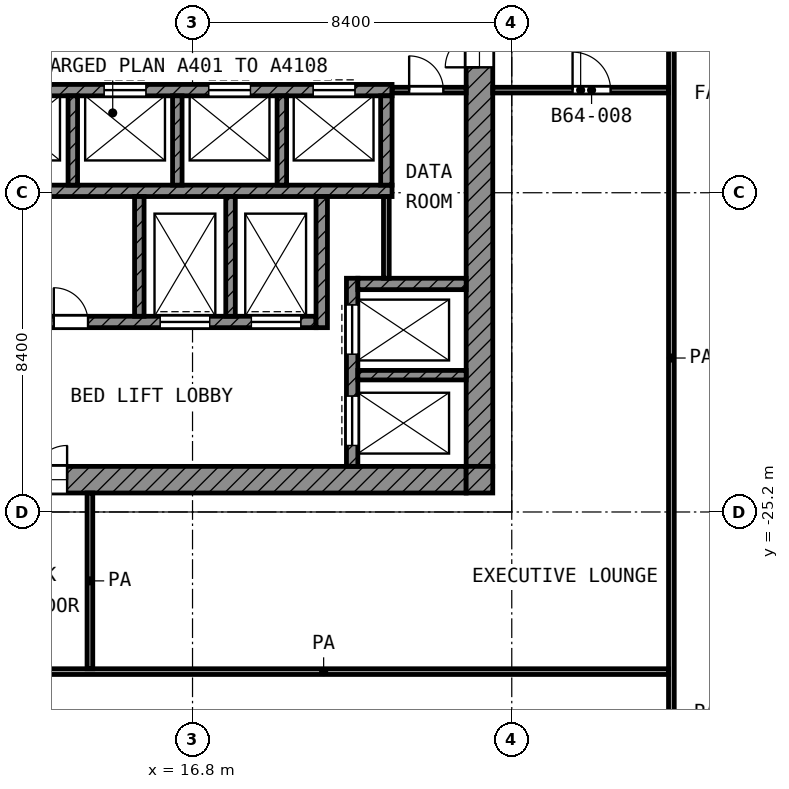
"""IFC4 building model, lengths in metres.
Left out: names, types, materials, properties, quantities, classifications, styles, units other than length and angle.
Written with IfcOpenShell. Run it as: python <this file> out.ifc"""

import sys

from ifc_helpers import new_model, si_unit, direction, frame, frame_2d, origin, place, context, subcontext, project, spatial, rectangle, extrude, element, fill, save


model = new_model("IFC4")
c1 = context("Model", 3, precision=1e-05, world=origin(), true_north=direction((0.0, 1.0)))
c2 = subcontext(c1, "Body", "Model", "MODEL_VIEW")
j1 = project(units=[si_unit("LENGTHUNIT", "METRE"), si_unit("PLANEANGLEUNIT", "RADIAN")], contexts=[c1])
p1 = place(None, origin())
s1 = spatial("IfcSite", under=j1, at=p1, CompositionType="ELEMENT")
p2 = place(p1, origin())
s2 = spatial("IfcBuilding", under=s1, at=p2, CompositionType="ELEMENT")
p3 = place(p2, frame((0.0, 0.0, 277.6)))
s3 = spatial("IfcBuildingStorey", under=s2, at=p3, CompositionType="ELEMENT", Elevation=277.6)
p4 = place(p3, frame((24.35, -24.0, 0.0), z_axis=(0.0, 0.0, 1.0), x_axis=(0.0, 1.0, 0.0)))
e1 = element("IfcWall", 1, at=p4, inside=s3, PredefinedType="SHEAR", context=c2, shape_type="SweptSolid", body=[
    extrude(rectangle(XDim=18.6, YDim=0.7, at=frame_2d((9.3, 0.0))), origin(), (0.0, 0.0, 1.0), 3.6),
])
p5 = place(p4, frame((10.5, 0.0, 0.0)))
e2 = element("IfcOpeningElement", 2, at=p5, cuts=e1, PredefinedType="OPENING", context=c2, shape_type="SweptSolid", body=[
    extrude(rectangle(XDim=1.8, YDim=2.1, at=frame_2d((0.9, 1.05))), frame((0.0, 0.36, 0.0), z_axis=(0.0, -1.0, 0.0), x_axis=(1.0, 0.0, 0.0)), (0.0, 0.0, 1.0), 0.72),
])
p6 = place(p3, frame((5.4, -24.35, 0.0), z_axis=(0.0, 0.0, 1.0), x_axis=(1.0, 0.0, 0.0)))
e3 = element("IfcWall", 3, at=p6, inside=s3, PredefinedType="SHEAR", context=c2, shape_type="SweptSolid", body=[
    extrude(rectangle(XDim=18.6, YDim=0.7, at=frame_2d((9.3, 0.0))), origin(), (0.0, 0.0, 1.0), 3.6),
])
p7 = place(p6, frame((6.3, 0.0, 0.0)))
e4 = element("IfcOpeningElement", 4, at=p7, cuts=e3, PredefinedType="OPENING", context=c2, shape_type="SweptSolid", body=[
    extrude(rectangle(XDim=1.8, YDim=2.1, at=frame_2d((0.9, 1.05))), frame((0.0, 0.36, 0.0), z_axis=(0.0, -1.0, 0.0), x_axis=(1.0, 0.0, 0.0)), (0.0, 0.0, 1.0), 0.72),
])
p8 = place(p3, frame((24.35, -24.7, 0.0), z_axis=(0.0, 0.0, 1.0), x_axis=(0.0, 1.0, 0.0)))
e5 = element("IfcWall", 5, at=p8, inside=s3, PredefinedType="SHEAR", context=c2, shape_type="SweptSolid", body=[
    extrude(rectangle(XDim=0.7, YDim=0.7, at=frame_2d((0.35, 0.0))), origin(), (0.0, 0.0, 1.0), 3.6),
])
p9 = place(p3, frame((5.4, -14.1, 0.0), z_axis=(0.0, 0.0, 1.0), x_axis=(1.0, 0.0, 0.0)))
e6 = element("IfcWall", 6, at=p9, inside=s3, PredefinedType="SHEAR", context=c2, shape_type="SweptSolid", body=[
    extrude(rectangle(XDim=16.65, YDim=0.3, at=frame_2d((8.325, 0.0))), origin(), (0.0, 0.0, 1.0), 3.6),
])
p10 = place(p9, frame((0.825, 0.0, 0.0)))
e7 = element("IfcOpeningElement", 7, at=p10, cuts=e6, PredefinedType="OPENING", context=c2, shape_type="SweptSolid", body=[
    extrude(rectangle(XDim=1.1, YDim=2.1, at=frame_2d((0.55, 1.05))), frame((0.0, 0.16, 0.0), z_axis=(0.0, -1.0, 0.0), x_axis=(1.0, 0.0, 0.0)), (0.0, 0.0, 1.0), 0.32),
])
p11 = place(p9, frame((3.575, 0.0, 0.0)))
e8 = element("IfcOpeningElement", 8, at=p11, cuts=e6, PredefinedType="OPENING", context=c2, shape_type="SweptSolid", body=[
    extrude(rectangle(XDim=1.1, YDim=2.1, at=frame_2d((0.55, 1.05))), frame((0.0, 0.16, 0.0), z_axis=(0.0, -1.0, 0.0), x_axis=(1.0, 0.0, 0.0)), (0.0, 0.0, 1.0), 0.32),
])
p12 = place(p9, frame((6.325, 0.0, 0.0)))
e9 = element("IfcOpeningElement", 9, at=p12, cuts=e6, PredefinedType="OPENING", context=c2, shape_type="SweptSolid", body=[
    extrude(rectangle(XDim=1.1, YDim=2.1, at=frame_2d((0.55, 1.05))), frame((0.0, 0.16, 0.0), z_axis=(0.0, -1.0, 0.0), x_axis=(1.0, 0.0, 0.0)), (0.0, 0.0, 1.0), 0.32),
])
p13 = place(p9, frame((9.075, 0.0, 0.0)))
e10 = element("IfcOpeningElement", 10, at=p13, cuts=e6, PredefinedType="OPENING", context=c2, shape_type="SweptSolid", body=[
    extrude(rectangle(XDim=1.1, YDim=2.1, at=frame_2d((0.55, 1.05))), frame((0.0, 0.16, 0.0), z_axis=(0.0, -1.0, 0.0), x_axis=(1.0, 0.0, 0.0)), (0.0, 0.0, 1.0), 0.32),
])
p14 = place(p9, frame((11.825, 0.0, 0.0)))
e11 = element("IfcOpeningElement", 11, at=p14, cuts=e6, PredefinedType="OPENING", context=c2, shape_type="SweptSolid", body=[
    extrude(rectangle(XDim=1.1, YDim=2.1, at=frame_2d((0.55, 1.05))), frame((0.0, 0.16, 0.0), z_axis=(0.0, -1.0, 0.0), x_axis=(1.0, 0.0, 0.0)), (0.0, 0.0, 1.0), 0.32),
])
p15 = place(p9, frame((14.575, 0.0, 0.0)))
e12 = element("IfcOpeningElement", 12, at=p15, cuts=e6, PredefinedType="OPENING", context=c2, shape_type="SweptSolid", body=[
    extrude(rectangle(XDim=1.1, YDim=2.1, at=frame_2d((0.55, 1.05))), frame((0.0, 0.16, 0.0), z_axis=(0.0, -1.0, 0.0), x_axis=(1.0, 0.0, 0.0)), (0.0, 0.0, 1.0), 0.32),
])
p16 = place(p3, frame((5.4, -16.75, 0.0), z_axis=(0.0, 0.0, 1.0), x_axis=(1.0, 0.0, 0.0)))
e13 = element("IfcWall", 13, at=p16, inside=s3, PredefinedType="SHEAR", context=c2, shape_type="SweptSolid", body=[
    extrude(rectangle(XDim=16.65, YDim=0.3, at=frame_2d((8.325, 0.0))), origin(), (0.0, 0.0, 1.0), 3.6),
])
p17 = place(p3, frame((5.4, -20.2, 0.0), z_axis=(0.0, 0.0, 1.0), x_axis=(1.0, 0.0, 0.0)))
e14 = element("IfcWall", 14, at=p17, inside=s3, PredefinedType="SHEAR", context=c2, shape_type="SweptSolid", body=[
    extrude(rectangle(XDim=14.65, YDim=0.3, at=frame_2d((7.325, 0.0))), origin(), (0.0, 0.0, 1.0), 3.6),
])
p18 = place(p17, frame((10.55, 0.0, 0.0)))
e15 = element("IfcOpeningElement", 15, at=p18, cuts=e14, PredefinedType="OPENING", context=c2, shape_type="SweptSolid", body=[
    extrude(rectangle(XDim=1.3, YDim=2.1, at=frame_2d((0.65, 1.05))), frame((0.0, 0.16, 0.0), z_axis=(0.0, -1.0, 0.0), x_axis=(1.0, 0.0, 0.0)), (0.0, 0.0, 1.0), 0.32),
])
p19 = place(p17, frame((12.95, 0.0, 0.0)))
e16 = element("IfcOpeningElement", 16, at=p19, cuts=e14, PredefinedType="OPENING", context=c2, shape_type="SweptSolid", body=[
    extrude(rectangle(XDim=1.3, YDim=2.1, at=frame_2d((0.65, 1.05))), frame((0.0, 0.16, 0.0), z_axis=(0.0, -1.0, 0.0), x_axis=(1.0, 0.0, 0.0)), (0.0, 0.0, 1.0), 0.32),
])
p20 = place(p17, frame((0.55, 0.0, 0.0)))
e17 = element("IfcOpeningElement", 17, at=p20, cuts=e14, PredefinedType="OPENING", context=c2, shape_type="SweptSolid", body=[
    extrude(rectangle(XDim=1.3, YDim=2.1, at=frame_2d((0.65, 1.05))), frame((0.0, 0.16, 0.0), z_axis=(0.0, -1.0, 0.0), x_axis=(1.0, 0.0, 0.0)), (0.0, 0.0, 1.0), 0.32),
])
p21 = place(p17, frame((2.95, 0.0, 0.0)))
e18 = element("IfcOpeningElement", 18, at=p21, cuts=e14, PredefinedType="OPENING", context=c2, shape_type="SweptSolid", body=[
    extrude(rectangle(XDim=1.3, YDim=2.1, at=frame_2d((0.65, 1.05))), frame((0.0, 0.16, 0.0), z_axis=(0.0, -1.0, 0.0), x_axis=(1.0, 0.0, 0.0)), (0.0, 0.0, 1.0), 0.32),
])
p22 = place(p17, frame((5.35, 0.0, 0.0)))
e19 = element("IfcOpeningElement", 19, at=p22, cuts=e14, PredefinedType="OPENING", context=c2, shape_type="SweptSolid", body=[
    extrude(rectangle(XDim=0.9, YDim=2.1, at=frame_2d((0.45, 1.05))), frame((0.0, 0.16, 0.0), z_axis=(0.0, -1.0, 0.0), x_axis=(1.0, 0.0, 0.0)), (0.0, 0.0, 1.0), 0.32),
])
p23 = place(p17, frame((7.75, 0.0, 0.0)))
e20 = element("IfcOpeningElement", 20, at=p23, cuts=e14, PredefinedType="OPENING", context=c2, shape_type="SweptSolid", body=[
    extrude(rectangle(XDim=0.9, YDim=2.1, at=frame_2d((0.45, 1.05))), frame((0.0, 0.16, 0.0), z_axis=(0.0, -1.0, 0.0), x_axis=(1.0, 0.0, 0.0)), (0.0, 0.0, 1.0), 0.32),
])
p24 = place(p3, frame((20.2, -20.35, 0.0), z_axis=(0.0, 0.0, 1.0), x_axis=(0.0, 1.0, 0.0)))
e21 = element("IfcWall", 21, at=p24, inside=s3, PredefinedType="SHEAR", context=c2, shape_type="SweptSolid", body=[
    extrude(rectangle(XDim=3.45, YDim=0.3, at=frame_2d((1.725, 0.0))), origin(), (0.0, 0.0, 1.0), 3.6),
])
p25 = place(p3, frame((21.9, -16.6, 0.0), z_axis=(0.0, 0.0, 1.0), x_axis=(0.0, 1.0, 0.0)))
e22 = element("IfcWall", 22, at=p25, inside=s3, PredefinedType="SHEAR", context=c2, shape_type="SweptSolid", body=[
    extrude(rectangle(XDim=2.35, YDim=0.3, at=frame_2d((1.175, 0.0))), origin(), (0.0, 0.0, 1.0), 3.6),
])
p26 = place(p3, frame((21.15, -19.2, 0.0), z_axis=(0.0, 0.0, 1.0), x_axis=(1.0, 0.0, 0.0)))
e23 = element("IfcWall", 23, at=p26, inside=s3, PredefinedType="SHEAR", context=c2, shape_type="SweptSolid", body=[
    extrude(rectangle(XDim=2.85, YDim=0.3, at=frame_2d((1.425, 0.0))), origin(), (0.0, 0.0, 1.0), 3.6),
])
p27 = place(p3, frame((21.0, -24.0, 0.0), z_axis=(0.0, 0.0, 1.0), x_axis=(0.0, 1.0, 0.0)))
e24 = element("IfcWall", 24, at=p27, inside=s3, PredefinedType="SHEAR", context=c2, shape_type="SweptSolid", body=[
    extrude(rectangle(XDim=4.95, YDim=0.3, at=frame_2d((2.475, 0.0))), origin(), (0.0, 0.0, 1.0), 3.6),
])
p28 = place(p27, frame((2.95, 0.0, 0.0)))
e25 = element("IfcOpeningElement", 25, at=p28, cuts=e24, PredefinedType="OPENING", context=c2, shape_type="SweptSolid", body=[
    extrude(rectangle(XDim=1.3, YDim=2.1, at=frame_2d((0.65, 1.05))), frame((0.0, 0.16, 0.0), z_axis=(0.0, -1.0, 0.0), x_axis=(1.0, 0.0, 0.0)), (0.0, 0.0, 1.0), 0.32),
])
p29 = place(p27, frame((0.55, 0.0, 0.0)))
e26 = element("IfcOpeningElement", 26, at=p29, cuts=e24, PredefinedType="OPENING", context=c2, shape_type="SweptSolid", body=[
    extrude(rectangle(XDim=1.3, YDim=2.1, at=frame_2d((0.65, 1.05))), frame((0.0, 0.16, 0.0), z_axis=(0.0, -1.0, 0.0), x_axis=(1.0, 0.0, 0.0)), (0.0, 0.0, 1.0), 0.32),
])
p30 = place(p3, frame((21.15, -21.6, 0.0), z_axis=(0.0, 0.0, 1.0), x_axis=(1.0, 0.0, 0.0)))
e27 = element("IfcWall", 27, at=p30, inside=s3, PredefinedType="SHEAR", context=c2, shape_type="SweptSolid", body=[
    extrude(rectangle(XDim=2.85, YDim=0.25, at=frame_2d((1.425, 0.0))), origin(), (0.0, 0.0, 1.0), 3.6),
])
for number, where, z_axis, x_axis in (
    (28, (15.4, -20.05, 0.0), (0.0, 0.0, 1.0), (0.0, 1.0, 0.0)),
    (29, (17.8, -20.05, 0.0), (0.0, 0.0, 1.0), (0.0, 1.0, 0.0)),
):
    element("IfcWall", number, at=place(p3, frame(where, z_axis=z_axis, x_axis=x_axis)), inside=s3, PredefinedType="SHEAR", context=c2, shape_type="SweptSolid", body=[
        extrude(rectangle(XDim=3.15, YDim=0.25, at=frame_2d((1.575, 0.0))), origin(), (0.0, 0.0, 1.0), 3.6),
    ])
for number, where, z_axis, x_axis in (
    (30, (13.65, -16.6, 0.0), (0.0, 0.0, 1.0), (0.0, 1.0, 0.0)),
    (31, (16.4, -16.6, 0.0), (0.0, 0.0, 1.0), (0.0, 1.0, 0.0)),
    (32, (19.15, -16.6, 0.0), (0.0, 0.0, 1.0), (0.0, 1.0, 0.0)),
):
    element("IfcWall", number, at=place(p3, frame(where, z_axis=z_axis, x_axis=x_axis)), inside=s3, PredefinedType="SHEAR", context=c2, shape_type="SweptSolid", body=[
        extrude(rectangle(XDim=2.35, YDim=0.25, at=frame_2d((1.175, 0.0))), origin(), (0.0, 0.0, 1.0), 3.6),
    ])
p31 = place(p3, frame((21.9, -19.05, 0.0), z_axis=(0.0, 0.0, 1.0), x_axis=(0.0, 1.0, 0.0)))
e33 = element("IfcWall", 33, at=p31, inside=s3, PredefinedType="PARTITIONING", context=c2, shape_type="SweptSolid", body=[
    extrude(rectangle(XDim=2.15, YDim=0.15, at=frame_2d((1.075, 0.0))), origin(), (0.0, 0.0, 1.0), 3.6),
])
p32 = place(p3, frame((22.05, -14.1, 0.0), z_axis=(0.0, 0.0, 1.0), x_axis=(1.0, 0.0, 0.0)))
e34 = element("IfcWall", 34, at=p32, inside=s3, PredefinedType="PARTITIONING", context=c2, shape_type="SweptSolid", body=[
    extrude(rectangle(XDim=1.95, YDim=0.15, at=frame_2d((0.975, 0.0))), origin(), (0.0, 0.0, 1.0), 3.6),
])
p33 = place(p32, frame((0.45, 0.0, 0.0)))
e35 = element("IfcOpeningElement", 35, at=p33, cuts=e34, PredefinedType="OPENING", context=c2, shape_type="SweptSolid", body=[
    extrude(rectangle(XDim=0.9, YDim=2.1, at=frame_2d((0.45, 1.05))), frame((0.0, 0.085, 0.0), z_axis=(0.0, -1.0, 0.0), x_axis=(1.0, 0.0, 0.0)), (0.0, 0.0, 1.0), 0.17),
])
p34 = place(p3, frame((11.175, -29.4, 0.0), z_axis=(0.0, 0.0, 1.0), x_axis=(1.0, 0.0, 0.0)))
e36 = element("IfcWall", 36, at=p34, inside=s3, PredefinedType="PARTITIONING", context=c2, shape_type="SweptSolid", body=[
    extrude(rectangle(XDim=18.15, YDim=0.15, at=frame_2d((9.075, 0.0))), origin(), (0.0, 0.0, 1.0), 3.6),
])
p35 = place(p3, frame((24.7, -14.1, 0.0), z_axis=(0.0, 0.0, 1.0), x_axis=(1.0, 0.0, 0.0)))
e37 = element("IfcWall", 37, at=p35, inside=s3, PredefinedType="PARTITIONING", context=c2, shape_type="SweptSolid", body=[
    extrude(rectangle(XDim=4.625, YDim=0.15, at=frame_2d((2.312, 0.0))), origin(), (0.0, 0.0, 1.0), 3.6),
])
p36 = place(p35, frame((2.1, 0.0, 0.0)))
e38 = element("IfcOpeningElement", 38, at=p36, cuts=e37, PredefinedType="OPENING", context=c2, shape_type="SweptSolid", body=[
    extrude(rectangle(XDim=1.0, YDim=2.1, at=frame_2d((0.5, 1.05))), frame((0.0, 0.085, 0.0), z_axis=(0.0, -1.0, 0.0), x_axis=(1.0, 0.0, 0.0)), (0.0, 0.0, 1.0), 0.17),
])
p37 = place(p3, frame((14.1, -29.325, 0.0), z_axis=(0.0, 0.0, 1.0), x_axis=(0.0, 1.0, 0.0)))
e39 = element("IfcWall", 39, at=p37, inside=s3, PredefinedType="PARTITIONING", context=c2, shape_type="SweptSolid", body=[
    extrude(rectangle(XDim=4.625, YDim=0.15, at=frame_2d((2.312, 0.0))), origin(), (0.0, 0.0, 1.0), 3.6),
])
p38 = place(p3, frame((29.4, -31.198, 0.0), z_axis=(0.0, 0.0, 1.0), x_axis=(0.0, 1.0, 0.0)))
e40 = element("IfcWall", 40, at=p38, inside=s3, PredefinedType="PARTITIONING", context=c2, shape_type="SweptSolid", body=[
    extrude(rectangle(XDim=20.098, YDim=0.15, at=frame_2d((10.049, 0.0))), origin(), (0.0, 0.0, 1.0), 3.6),
])
p39 = place(p13, origin())
e41 = element("IfcDoor", 41, at=p39, inside=s3, OperationType="DOUBLE_DOOR_SLIDING", PredefinedType="DOOR", context=c2, shape_type="SweptSolid", body=[
    extrude(rectangle(XDim=1.1, YDim=2.1, at=frame_2d((0.55, 1.05))), frame((0.0, 0.025, 0.0), z_axis=(0.0, -1.0, 0.0), x_axis=(1.0, 0.0, 0.0)), (0.0, 0.0, 1.0), 0.05),
])
fill(e10, e41)
p40 = place(p14, origin())
e42 = element("IfcDoor", 42, at=p40, inside=s3, OperationType="DOUBLE_DOOR_SLIDING", PredefinedType="DOOR", context=c2, shape_type="SweptSolid", body=[
    extrude(rectangle(XDim=1.1, YDim=2.1, at=frame_2d((0.55, 1.05))), frame((0.0, 0.025, 0.0), z_axis=(0.0, -1.0, 0.0), x_axis=(1.0, 0.0, 0.0)), (0.0, 0.0, 1.0), 0.05),
])
fill(e11, e42)
p41 = place(p15, origin())
e43 = element("IfcDoor", 43, at=p41, inside=s3, OperationType="DOUBLE_DOOR_SLIDING", PredefinedType="DOOR", context=c2, shape_type="SweptSolid", body=[
    extrude(rectangle(XDim=1.1, YDim=2.1, at=frame_2d((0.55, 1.05))), frame((0.0, 0.025, 0.0), z_axis=(0.0, -1.0, 0.0), x_axis=(1.0, 0.0, 0.0)), (0.0, 0.0, 1.0), 0.05),
])
fill(e12, e43)
p42 = place(p28, origin())
e44 = element("IfcDoor", 44, at=p42, inside=s3, OperationType="DOUBLE_DOOR_SLIDING", PredefinedType="DOOR", context=c2, shape_type="SweptSolid", body=[
    extrude(rectangle(XDim=1.3, YDim=2.1, at=frame_2d((0.65, 1.05))), frame((0.0, 0.025, 0.0), z_axis=(0.0, -1.0, 0.0), x_axis=(1.0, 0.0, 0.0)), (0.0, 0.0, 1.0), 0.05),
])
fill(e25, e44)
p43 = place(p29, origin())
e45 = element("IfcDoor", 45, at=p43, inside=s3, OperationType="DOUBLE_DOOR_SLIDING", PredefinedType="DOOR", context=c2, shape_type="SweptSolid", body=[
    extrude(rectangle(XDim=1.3, YDim=2.1, at=frame_2d((0.65, 1.05))), frame((0.0, 0.025, 0.0), z_axis=(0.0, -1.0, 0.0), x_axis=(1.0, 0.0, 0.0)), (0.0, 0.0, 1.0), 0.05),
])
fill(e26, e45)
p44 = place(p18, origin())
e46 = element("IfcDoor", 46, at=p44, inside=s3, OperationType="DOUBLE_DOOR_SLIDING", PredefinedType="DOOR", context=c2, shape_type="SweptSolid", body=[
    extrude(rectangle(XDim=1.3, YDim=2.1, at=frame_2d((0.65, 1.05))), frame((0.0, 0.025, 0.0), z_axis=(0.0, -1.0, 0.0), x_axis=(1.0, 0.0, 0.0)), (0.0, 0.0, 1.0), 0.05),
])
fill(e15, e46)
p45 = place(p19, origin())
e47 = element("IfcDoor", 47, at=p45, inside=s3, OperationType="DOUBLE_DOOR_SLIDING", PredefinedType="DOOR", context=c2, shape_type="SweptSolid", body=[
    extrude(rectangle(XDim=1.3, YDim=2.1, at=frame_2d((0.65, 1.05))), frame((0.0, 0.025, 0.0), z_axis=(0.0, -1.0, 0.0), x_axis=(1.0, 0.0, 0.0)), (0.0, 0.0, 1.0), 0.05),
])
fill(e16, e47)
p46 = place(p5, origin())
e48 = element("IfcDoor", 48, at=p46, inside=s3, OperationType="DOUBLE_DOOR_SINGLE_SWING", PredefinedType="DOOR", context=c2, shape_type="SweptSolid", body=[
    extrude(rectangle(XDim=1.8, YDim=2.1, at=frame_2d((0.9, 1.05))), frame((0.0, 0.025, 0.0), z_axis=(0.0, -1.0, 0.0), x_axis=(1.0, 0.0, 0.0)), (0.0, 0.0, 1.0), 0.05),
])
fill(e2, e48)
p47 = place(p7, origin())
e49 = element("IfcDoor", 49, at=p47, inside=s3, OperationType="DOUBLE_DOOR_SINGLE_SWING", PredefinedType="DOOR", context=c2, shape_type="SweptSolid", body=[
    extrude(rectangle(XDim=1.8, YDim=2.1, at=frame_2d((0.9, 1.05))), frame((0.0, 0.025, 0.0), z_axis=(0.0, -1.0, 0.0), x_axis=(1.0, 0.0, 0.0)), (0.0, 0.0, 1.0), 0.05),
])
fill(e4, e49)
p48 = place(p33, origin())
e50 = element("IfcDoor", 50, at=p48, inside=s3, OperationType="SINGLE_SWING_LEFT", PredefinedType="DOOR", context=c2, shape_type="SweptSolid", body=[
    extrude(rectangle(XDim=0.9, YDim=2.1, at=frame_2d((0.45, 1.05))), frame((0.0, 0.025, 0.0), z_axis=(0.0, -1.0, 0.0), x_axis=(1.0, 0.0, 0.0)), (0.0, 0.0, 1.0), 0.05),
])
fill(e35, e50)
p49 = place(p23, origin())
e51 = element("IfcDoor", 51, at=p49, inside=s3, OperationType="SINGLE_SWING_LEFT", PredefinedType="DOOR", context=c2, shape_type="SweptSolid", body=[
    extrude(rectangle(XDim=0.9, YDim=2.1, at=frame_2d((0.45, 1.05))), frame((0.0, 0.025, 0.0), z_axis=(0.0, -1.0, 0.0), x_axis=(1.0, 0.0, 0.0)), (0.0, 0.0, 1.0), 0.05),
])
fill(e20, e51)
p50 = place(p36, origin())
e52 = element("IfcDoor", 52, at=p50, inside=s3, OperationType="SINGLE_SWING_LEFT", PredefinedType="DOOR", context=c2, shape_type="SweptSolid", body=[
    extrude(rectangle(XDim=1.0, YDim=2.1, at=frame_2d((0.5, 1.05))), frame((0.0, 0.025, 0.0), z_axis=(0.0, -1.0, 0.0), x_axis=(1.0, 0.0, 0.0)), (0.0, 0.0, 1.0), 0.05),
])
fill(e38, e52)
save(model, sys.argv[1])
